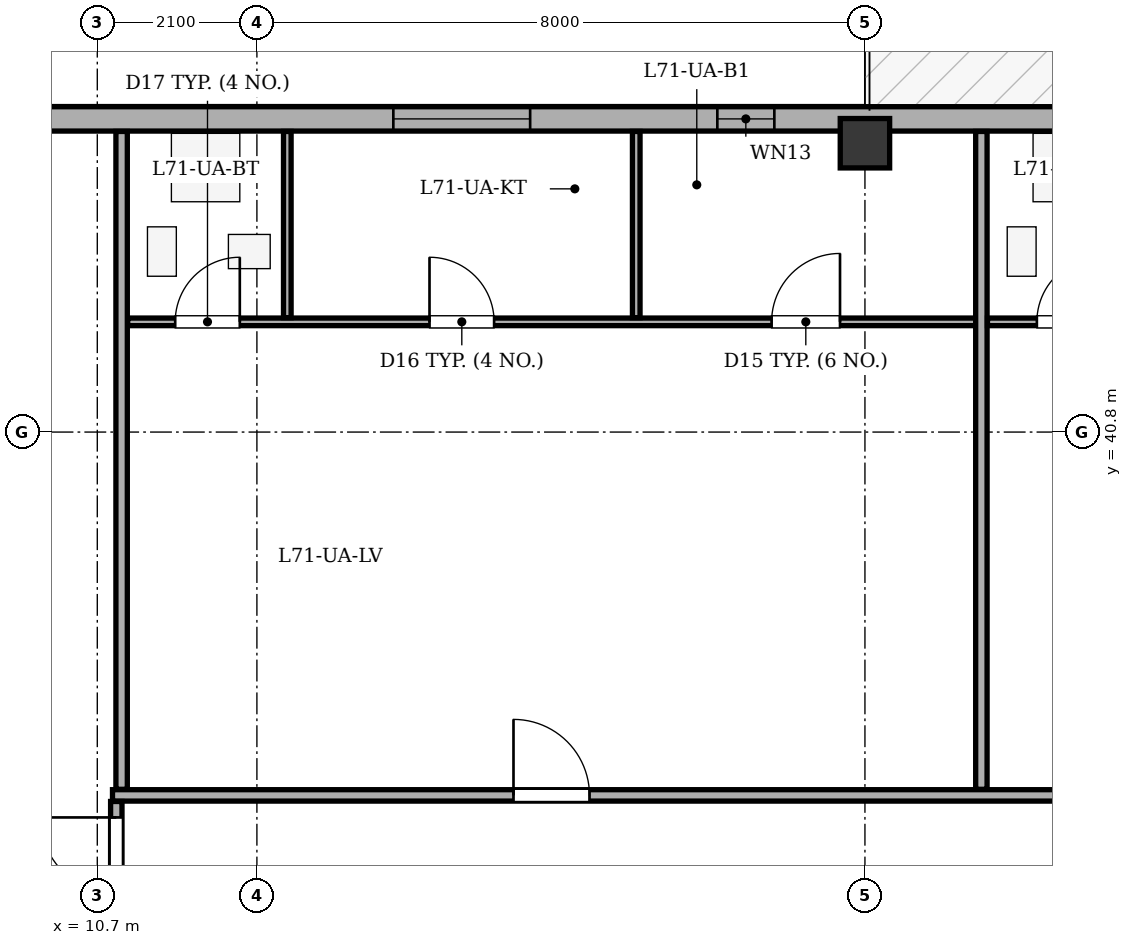
"""IFC4 building model, lengths in metres.
Left out: names, types, materials, properties, quantities, classifications, styles, units other than length and angle.
Written with IfcOpenShell. Run it as: python <this file> out.ifc"""

import sys

from ifc_helpers import new_model, si_unit, direction, frame, frame_2d, origin, origin_2d, place, context, subcontext, project, spatial, rectangle, extrude, element, fill, save


model = new_model("IFC4")
c1 = context("Model", 3, precision=1e-05, world=origin(), true_north=direction((0.0, 1.0)))
c2 = subcontext(c1, "Body", "Model", "MODEL_VIEW")
j1 = project(units=[si_unit("LENGTHUNIT", "METRE"), si_unit("PLANEANGLEUNIT", "RADIAN")], contexts=[c1])
p1 = place(None, origin())
s1 = spatial("IfcSite", under=j1, at=p1, CompositionType="ELEMENT")
p2 = place(p1, origin())
s2 = spatial("IfcBuilding", under=s1, at=p2, CompositionType="ELEMENT")
p3 = place(p2, frame((0.0, 0.0, 268.7)))
s3 = spatial("IfcBuildingStorey", under=s2, at=p3, CompositionType="ELEMENT", Elevation=268.7)
p4 = place(p3, frame((20.8, 44.6, 0.0), z_axis=(0.0, 0.0, 1.0), x_axis=(1.0, 0.0, 0.0)))
e1 = element("IfcColumn", 1, at=p4, inside=s3, PredefinedType="COLUMN", context=c2, shape_type="SweptSolid", body=[
    extrude(rectangle(XDim=0.65, YDim=0.65, at=origin_2d()), origin(), (0.0, 0.0, 1.0), 3.4),
])
p5 = place(p3, frame((8.3, 44.92, 0.0), z_axis=(0.0, 0.0, 1.0), x_axis=(1.0, 0.0, 0.0)))
e2 = element("IfcWall", 2, at=p5, inside=s3, PredefinedType="STANDARD", context=c2, shape_type="SweptSolid", body=[
    extrude(rectangle(XDim=37.0, YDim=0.32, at=frame_2d((18.5, 0.0))), origin(), (0.0, 0.0, 1.0), 2.725),
])
p6 = place(p5, frame((17.0, 0.0, 0.0)))
e3 = element("IfcOpeningElement", 3, at=p6, cuts=e2, PredefinedType="OPENING", context=c2, shape_type="SweptSolid", body=[
    extrude(rectangle(XDim=1.0, YDim=2.02, at=frame_2d((0.5, 1.01))), frame((0.0, 0.17, 0.0), z_axis=(0.0, -1.0, 0.0), x_axis=(1.0, 0.0, 0.0)), (0.0, 0.0, 1.0), 0.34),
])
p7 = place(p5, frame((6.295, 0.0, 0.75)))
e4 = element("IfcOpeningElement", 4, at=p7, cuts=e2, PredefinedType="OPENING", context=c2, shape_type="SweptSolid", body=[
    extrude(rectangle(XDim=1.8, YDim=1.7, at=frame_2d((0.9, 0.85))), frame((0.0, 0.17, 0.0), z_axis=(0.0, -1.0, 0.0), x_axis=(1.0, 0.0, 0.0)), (0.0, 0.0, 1.0), 0.34),
])
p8 = place(p5, frame((23.886, 0.0, 0.75)))
e5 = element("IfcOpeningElement", 5, at=p8, cuts=e2, PredefinedType="OPENING", context=c2, shape_type="SweptSolid", body=[
    extrude(rectangle(XDim=1.25, YDim=1.7, at=frame_2d((0.625, 0.85))), frame((0.0, 0.17, 0.0), z_axis=(0.0, -1.0, 0.0), x_axis=(1.0, 0.0, 0.0)), (0.0, 0.0, 1.0), 0.34),
])
p9 = place(p5, frame((29.503, 0.0, 0.75)))
e6 = element("IfcOpeningElement", 6, at=p9, cuts=e2, PredefinedType="OPENING", context=c2, shape_type="SweptSolid", body=[
    extrude(rectangle(XDim=1.8, YDim=1.7, at=frame_2d((0.9, 0.85))), frame((0.0, 0.17, 0.0), z_axis=(0.0, -1.0, 0.0), x_axis=(1.0, 0.0, 0.0)), (0.0, 0.0, 1.0), 0.34),
])
p10 = place(p5, frame((33.798, 0.0, 0.75)))
e7 = element("IfcOpeningElement", 7, at=p10, cuts=e2, PredefinedType="OPENING", context=c2, shape_type="SweptSolid", body=[
    extrude(rectangle(XDim=1.8, YDim=1.7, at=frame_2d((0.9, 0.85))), frame((0.0, 0.17, 0.0), z_axis=(0.0, -1.0, 0.0), x_axis=(1.0, 0.0, 0.0)), (0.0, 0.0, 1.0), 0.34),
])
p11 = place(p5, frame((10.558, 0.0, 0.75)))
e8 = element("IfcOpeningElement", 8, at=p11, cuts=e2, PredefinedType="OPENING", context=c2, shape_type="SweptSolid", body=[
    extrude(rectangle(XDim=0.75, YDim=1.45, at=frame_2d((0.375, 0.725))), frame((0.0, 0.17, 0.0), z_axis=(0.0, -1.0, 0.0), x_axis=(1.0, 0.0, 0.0)), (0.0, 0.0, 1.0), 0.34),
])
p12 = place(p5, frame((21.136, 0.0, 0.75)))
e9 = element("IfcOpeningElement", 9, at=p12, cuts=e2, PredefinedType="OPENING", context=c2, shape_type="SweptSolid", body=[
    extrude(rectangle(XDim=0.75, YDim=1.45, at=frame_2d((0.375, 0.725))), frame((0.0, 0.17, 0.0), z_axis=(0.0, -1.0, 0.0), x_axis=(1.0, 0.0, 0.0)), (0.0, 0.0, 1.0), 0.34),
])
p13 = place(p3, frame((10.9, 36.02, 0.0), z_axis=(0.0, 0.0, 1.0), x_axis=(1.0, 0.0, 0.0)))
e10 = element("IfcWall", 10, at=p13, inside=s3, PredefinedType="PARTITIONING", context=c2, shape_type="SweptSolid", body=[
    extrude(rectangle(XDim=34.52, YDim=0.15, at=frame_2d((17.26, 0.0))), origin(), (0.0, 0.0, 1.0), 3.1),
])
p14 = place(p13, frame((5.276, 0.0, 0.0)))
e11 = element("IfcOpeningElement", 11, at=p14, cuts=e10, PredefinedType="OPENING", context=c2, shape_type="SweptSolid", body=[
    extrude(rectangle(XDim=1.0, YDim=2.1, at=frame_2d((0.5, 1.05))), frame((0.0, 0.085, 0.0), z_axis=(0.0, -1.0, 0.0), x_axis=(1.0, 0.0, 0.0)), (0.0, 0.0, 1.0), 0.17),
])
p15 = place(p13, frame((16.931, 0.0, 0.0)))
e12 = element("IfcOpeningElement", 12, at=p15, cuts=e10, PredefinedType="OPENING", context=c2, shape_type="SweptSolid", body=[
    extrude(rectangle(XDim=1.0, YDim=2.1, at=frame_2d((0.5, 1.05))), frame((0.0, 0.085, 0.0), z_axis=(0.0, -1.0, 0.0), x_axis=(1.0, 0.0, 0.0)), (0.0, 0.0, 1.0), 0.17),
])
p16 = place(p13, frame((28.415, 0.0, 0.0)))
e13 = element("IfcOpeningElement", 13, at=p16, cuts=e10, PredefinedType="OPENING", context=c2, shape_type="SweptSolid", body=[
    extrude(rectangle(XDim=1.0, YDim=2.1, at=frame_2d((0.5, 1.05))), frame((0.0, 0.085, 0.0), z_axis=(0.0, -1.0, 0.0), x_axis=(1.0, 0.0, 0.0)), (0.0, 0.0, 1.0), 0.17),
])
p17 = place(p3, frame((11.02, 36.1, 0.0), z_axis=(0.0, 0.0, 1.0), x_axis=(0.0, 1.0, 0.0)))
e14 = element("IfcWall", 14, at=p17, inside=s3, PredefinedType="PARTITIONING", context=c2, shape_type="SweptSolid", body=[
    extrude(rectangle(XDim=8.655, YDim=0.15, at=frame_2d((4.327, 0.0))), origin(), (0.0, 0.0, 1.0), 3.1),
])
p18 = place(p3, frame((11.1, 42.25, 0.0), z_axis=(0.0, 0.0, 1.0), x_axis=(1.0, 0.0, 0.0)))
e15 = element("IfcWall", 15, at=p18, inside=s3, PredefinedType="PARTITIONING", context=c2, shape_type="SweptSolid", body=[
    extrude(rectangle(XDim=11.272, YDim=0.1, at=frame_2d((5.636, 0.0))), origin(), (0.0, 0.0, 1.0), 3.1),
])
p19 = place(p18, frame((0.625, 0.0, 0.0)))
e16 = element("IfcOpeningElement", 16, at=p19, cuts=e15, PredefinedType="OPENING", context=c2, shape_type="SweptSolid", body=[
    extrude(rectangle(XDim=0.85, YDim=2.05, at=frame_2d((0.425, 1.025))), frame((0.0, 0.06, 0.0), z_axis=(0.0, -1.0, 0.0), x_axis=(1.0, 0.0, 0.0)), (0.0, 0.0, 1.0), 0.12),
])
p20 = place(p18, frame((3.971, 0.0, 0.0)))
e17 = element("IfcOpeningElement", 17, at=p20, cuts=e15, PredefinedType="OPENING", context=c2, shape_type="SweptSolid", body=[
    extrude(rectangle(XDim=0.85, YDim=2.05, at=frame_2d((0.425, 1.025))), frame((0.0, 0.06, 0.0), z_axis=(0.0, -1.0, 0.0), x_axis=(1.0, 0.0, 0.0)), (0.0, 0.0, 1.0), 0.12),
])
p21 = place(p18, frame((8.472, 0.0, 0.0)))
e18 = element("IfcOpeningElement", 18, at=p21, cuts=e15, PredefinedType="OPENING", context=c2, shape_type="SweptSolid", body=[
    extrude(rectangle(XDim=0.9, YDim=2.05, at=frame_2d((0.45, 1.025))), frame((0.0, 0.06, 0.0), z_axis=(0.0, -1.0, 0.0), x_axis=(1.0, 0.0, 0.0)), (0.0, 0.0, 1.0), 0.12),
])
p22 = place(p3, frame((13.2, 42.305, 0.0), z_axis=(0.0, 0.0, 1.0), x_axis=(0.0, 1.0, 0.0)))
e19 = element("IfcWall", 19, at=p22, inside=s3, PredefinedType="PARTITIONING", context=c2, shape_type="SweptSolid", body=[
    extrude(rectangle(XDim=2.45, YDim=0.1, at=frame_2d((1.225, 0.0))), origin(), (0.0, 0.0, 1.0), 3.1),
])
p23 = place(p3, frame((17.791, 42.305, 0.0), z_axis=(0.0, 0.0, 1.0), x_axis=(0.0, 1.0, 0.0)))
e20 = element("IfcWall", 20, at=p23, inside=s3, PredefinedType="PARTITIONING", context=c2, shape_type="SweptSolid", body=[
    extrude(rectangle(XDim=2.45, YDim=0.1, at=frame_2d((1.225, 0.0))), origin(), (0.0, 0.0, 1.0), 2.725),
])
p24 = place(p3, frame((22.332, 36.1, 0.0), z_axis=(0.0, 0.0, 1.0), x_axis=(0.0, 1.0, 0.0)))
e21 = element("IfcWall", 21, at=p24, inside=s3, PredefinedType="PARTITIONING", context=c2, shape_type="SweptSolid", body=[
    extrude(rectangle(XDim=8.655, YDim=0.15, at=frame_2d((4.327, 0.0))), origin(), (0.0, 0.0, 1.0), 2.725),
])
p25 = place(p3, frame((22.412, 42.25, 0.0), z_axis=(0.0, 0.0, 1.0), x_axis=(1.0, 0.0, 0.0)))
e22 = element("IfcWall", 22, at=p25, inside=s3, PredefinedType="PARTITIONING", context=c2, shape_type="SweptSolid", body=[
    extrude(rectangle(XDim=11.958, YDim=0.1, at=frame_2d((5.979, 0.0))), origin(), (0.0, 0.0, 1.0), 3.1),
])
p26 = place(p25, frame((0.65, 0.0, 0.0)))
e23 = element("IfcOpeningElement", 23, at=p26, cuts=e22, PredefinedType="OPENING", context=c2, shape_type="SweptSolid", body=[
    extrude(rectangle(XDim=0.85, YDim=2.05, at=frame_2d((0.425, 1.025))), frame((0.0, 0.06, 0.0), z_axis=(0.0, -1.0, 0.0), x_axis=(1.0, 0.0, 0.0)), (0.0, 0.0, 1.0), 0.12),
])
p27 = place(p25, frame((3.61, 0.0, 0.0)))
e24 = element("IfcOpeningElement", 24, at=p27, cuts=e22, PredefinedType="OPENING", context=c2, shape_type="SweptSolid", body=[
    extrude(rectangle(XDim=0.85, YDim=2.05, at=frame_2d((0.425, 1.025))), frame((0.0, 0.06, 0.0), z_axis=(0.0, -1.0, 0.0), x_axis=(1.0, 0.0, 0.0)), (0.0, 0.0, 1.0), 0.12),
])
p28 = place(p25, frame((6.949, 0.0, 0.0)))
e25 = element("IfcOpeningElement", 25, at=p28, cuts=e22, PredefinedType="OPENING", context=c2, shape_type="SweptSolid", body=[
    extrude(rectangle(XDim=0.9, YDim=2.05, at=frame_2d((0.45, 1.025))), frame((0.0, 0.06, 0.0), z_axis=(0.0, -1.0, 0.0), x_axis=(1.0, 0.0, 0.0)), (0.0, 0.0, 1.0), 0.12),
])
p29 = place(p25, frame((9.909, 0.0, 0.0)))
e26 = element("IfcOpeningElement", 26, at=p29, cuts=e22, PredefinedType="OPENING", context=c2, shape_type="SweptSolid", body=[
    extrude(rectangle(XDim=0.9, YDim=2.05, at=frame_2d((0.45, 1.025))), frame((0.0, 0.06, 0.0), z_axis=(0.0, -1.0, 0.0), x_axis=(1.0, 0.0, 0.0)), (0.0, 0.0, 1.0), 0.12),
])
p30 = place(p3, frame((10.95, 34.15, 0.0), z_axis=(0.0, 0.0, 1.0), x_axis=(0.0, 1.0, 0.0)))
e27 = element("IfcWall", 27, at=p30, inside=s3, PredefinedType="PARTITIONING", context=c2, shape_type="SweptSolid", body=[
    extrude(rectangle(XDim=1.79, YDim=0.15, at=frame_2d((0.895, 0.0))), origin(), (0.0, 0.0, 1.0), 3.1),
])
p31 = place(p30, frame((0.58, 0.0, 0.0)))
e28 = element("IfcOpeningElement", 28, at=p31, cuts=e27, PredefinedType="OPENING", context=c2, shape_type="SweptSolid", body=[
    extrude(rectangle(XDim=1.0, YDim=2.1, at=frame_2d((0.5, 1.05))), frame((0.0, 0.085, 0.0), z_axis=(0.0, -1.0, 0.0), x_axis=(1.0, 0.0, 0.0)), (0.0, 0.0, 1.0), 0.17),
])
p32 = place(p7, origin())
e29 = element("IfcWindow", 29, at=p32, inside=s3, PartitioningType="SINGLE_PANEL", PredefinedType="WINDOW", context=c2, shape_type="SweptSolid", body=[
    extrude(rectangle(XDim=1.8, YDim=1.7, at=frame_2d((0.9, 0.85))), frame((0.0, -0.01, 0.0), z_axis=(0.0, -1.0, 0.0), x_axis=(1.0, 0.0, 0.0)), (0.0, 0.0, 1.0), 0.06),
])
fill(e4, e29)
p33 = place(p11, origin())
e30 = element("IfcWindow", 30, at=p33, inside=s3, PartitioningType="SINGLE_PANEL", PredefinedType="WINDOW", context=c2, shape_type="SweptSolid", body=[
    extrude(rectangle(XDim=0.75, YDim=1.45, at=frame_2d((0.375, 0.725))), frame((0.0, -0.01, 0.0), z_axis=(0.0, -1.0, 0.0), x_axis=(1.0, 0.0, 0.0)), (0.0, 0.0, 1.0), 0.06),
])
fill(e8, e30)
p34 = place(p14, origin())
e31 = element("IfcDoor", 31, at=p34, inside=s3, OperationType="SINGLE_SWING_LEFT", PredefinedType="DOOR", context=c2, shape_type="SweptSolid", body=[
    extrude(rectangle(XDim=1.0, YDim=2.1, at=frame_2d((0.5, 1.05))), frame((0.0, 0.025, 0.0), z_axis=(0.0, -1.0, 0.0), x_axis=(1.0, 0.0, 0.0)), (0.0, 0.0, 1.0), 0.05),
])
fill(e11, e31)
p35 = place(p19, origin())
e32 = element("IfcDoor", 32, at=p35, inside=s3, OperationType="SINGLE_SWING_RIGHT", PredefinedType="DOOR", context=c2, shape_type="SweptSolid", body=[
    extrude(rectangle(XDim=0.85, YDim=2.05, at=frame_2d((0.425, 1.025))), frame((0.0, 0.025, 0.0), z_axis=(0.0, -1.0, 0.0), x_axis=(1.0, 0.0, 0.0)), (0.0, 0.0, 1.0), 0.05),
])
fill(e16, e32)
p36 = place(p20, origin())
e33 = element("IfcDoor", 33, at=p36, inside=s3, OperationType="SINGLE_SWING_LEFT", PredefinedType="DOOR", context=c2, shape_type="SweptSolid", body=[
    extrude(rectangle(XDim=0.85, YDim=2.05, at=frame_2d((0.425, 1.025))), frame((0.0, 0.025, 0.0), z_axis=(0.0, -1.0, 0.0), x_axis=(1.0, 0.0, 0.0)), (0.0, 0.0, 1.0), 0.05),
])
fill(e17, e33)
p37 = place(p21, origin())
e34 = element("IfcDoor", 34, at=p37, inside=s3, OperationType="SINGLE_SWING_RIGHT", PredefinedType="DOOR", context=c2, shape_type="SweptSolid", body=[
    extrude(rectangle(XDim=0.9, YDim=2.05, at=frame_2d((0.45, 1.025))), frame((0.0, 0.025, 0.0), z_axis=(0.0, -1.0, 0.0), x_axis=(1.0, 0.0, 0.0)), (0.0, 0.0, 1.0), 0.05),
])
fill(e18, e34)
p38 = place(p26, origin())
e35 = element("IfcDoor", 35, at=p38, inside=s3, OperationType="SINGLE_SWING_RIGHT", PredefinedType="DOOR", context=c2, shape_type="SweptSolid", body=[
    extrude(rectangle(XDim=0.85, YDim=2.05, at=frame_2d((0.425, 1.025))), frame((0.0, 0.025, 0.0), z_axis=(0.0, -1.0, 0.0), x_axis=(1.0, 0.0, 0.0)), (0.0, 0.0, 1.0), 0.05),
])
fill(e23, e35)
p39 = place(p31, origin())
e36 = element("IfcDoor", 36, at=p39, inside=s3, OperationType="SINGLE_SWING_RIGHT", PredefinedType="DOOR", context=c2, shape_type="SweptSolid", body=[
    extrude(rectangle(XDim=1.0, YDim=2.1, at=frame_2d((0.5, 1.05))), frame((0.0, 0.025, 0.0), z_axis=(0.0, -1.0, 0.0), x_axis=(1.0, 0.0, 0.0)), (0.0, 0.0, 1.0), 0.05),
])
fill(e28, e36)
save(model, sys.argv[1])
